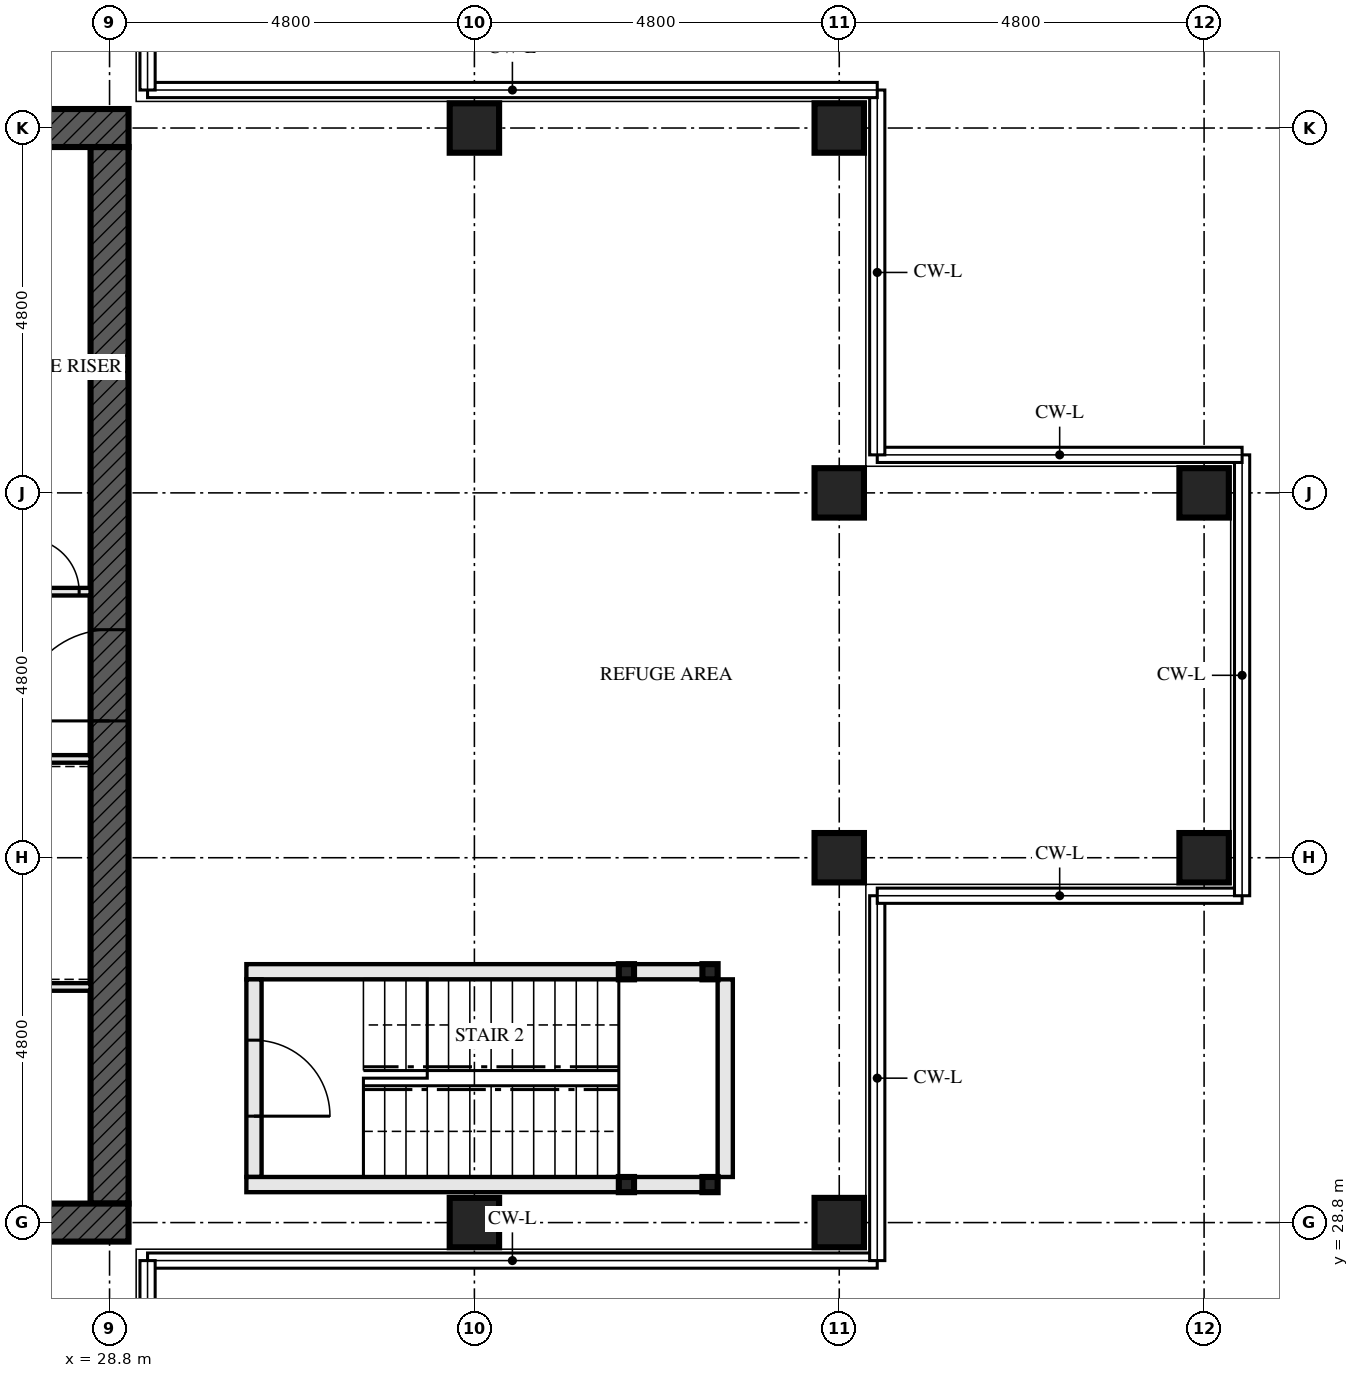
"""IFC4 building model, lengths in metres.
Left out: names, types, materials, properties, quantities, classifications, styles, units other than length and angle.
Written with IfcOpenShell. Run it as: python <this file> out.ifc"""

import sys

from ifc_helpers import new_model, si_unit, direction, frame, frame_2d, origin, origin_2d, place, context, subcontext, project, spatial, rectangle, hollow_rectangle, extrude, element, fill, save


model = new_model("IFC4")
c1 = context("Model", 3, precision=1e-05, world=origin(), true_north=direction((0.0, 1.0)))
c2 = subcontext(c1, "Body", "Model", "MODEL_VIEW")
j1 = project(units=[si_unit("LENGTHUNIT", "METRE"), si_unit("PLANEANGLEUNIT", "RADIAN")], contexts=[c1])
p1 = place(None, origin())
s1 = spatial("IfcSite", under=j1, at=p1, CompositionType="ELEMENT")
p2 = place(p1, origin())
s2 = spatial("IfcBuilding", under=s1, at=p2, CompositionType="ELEMENT")
p3 = place(p2, frame((0.0, 0.0, 190.0)))
s3 = spatial("IfcBuildingStorey", under=s2, at=p3, CompositionType="ELEMENT", Elevation=190.0)
for number, where, z_axis, x_axis in (
    (1, (33.6, 28.8, 0.0), (0.0, 0.0, 1.0), (0.0, 1.0, 0.0)),
    (2, (33.6, 43.2, 0.0), (0.0, 0.0, 1.0), (0.0, 1.0, 0.0)),
    (3, (38.4, 28.8, 0.0), (0.0, 0.0, 1.0), (0.0, 1.0, 0.0)),
    (4, (38.4, 33.6, 0.0), (0.0, 0.0, 1.0), (0.0, 1.0, 0.0)),
    (5, (38.4, 38.4, 0.0), (0.0, 0.0, 1.0), (0.0, 1.0, 0.0)),
    (6, (38.4, 43.2, 0.0), (0.0, 0.0, 1.0), (0.0, 1.0, 0.0)),
    (7, (43.2, 33.6, 0.0), (0.0, 0.0, 1.0), (0.0, 1.0, 0.0)),
    (8, (43.2, 38.4, 0.0), (0.0, 0.0, 1.0), (0.0, 1.0, 0.0)),
):
    element("IfcColumn", number, at=place(p3, frame(where, z_axis=z_axis, x_axis=x_axis)), inside=s3, PredefinedType="COLUMN", context=c2, shape_type="SweptSolid", body=[
        extrude(hollow_rectangle(XDim=0.65, YDim=0.65, WallThickness=0.08, at=origin_2d()), origin(), (0.0, 0.0, 1.0), 4.5),
    ])
p4 = place(p3, frame((14.15, 28.8, -0.25), z_axis=(0.0, 0.0, 1.0), x_axis=(1.0, 0.0, 0.0)))
e9 = element("IfcWall", 9, at=p4, inside=s3, PredefinedType="SHEAR", context=c2, shape_type="SweptSolid", body=[
    extrude(rectangle(XDim=14.9, YDim=0.5, at=frame_2d((7.45, 0.0))), origin(), (0.0, 0.0, 1.0), 4.58),
])
p5 = place(p4, frame((6.85, 0.0, 0.25)))
e10 = element("IfcOpeningElement", 10, at=p5, cuts=e9, PredefinedType="OPENING", context=c2, shape_type="SweptSolid", body=[
    extrude(rectangle(XDim=1.2, YDim=2.1, at=frame_2d((0.6, 1.05))), frame((0.0, 0.26, 0.0), z_axis=(0.0, -1.0, 0.0), x_axis=(1.0, 0.0, 0.0)), (0.0, 0.0, 1.0), 0.521),
])
p6 = place(p3, frame((29.05, 43.2, -0.25), z_axis=(0.0, 0.0, 1.0), x_axis=(-1.0, 0.0, 0.0)))
e11 = element("IfcWall", 11, at=p6, inside=s3, PredefinedType="SHEAR", context=c2, shape_type="SweptSolid", body=[
    extrude(rectangle(XDim=14.9, YDim=0.5, at=frame_2d((7.45, 0.0))), origin(), (0.0, 0.0, 1.0), 4.58),
])
p7 = place(p6, frame((6.85, 0.0, 0.25)))
e12 = element("IfcOpeningElement", 12, at=p7, cuts=e11, PredefinedType="OPENING", context=c2, shape_type="SweptSolid", body=[
    extrude(rectangle(XDim=1.2, YDim=2.1, at=frame_2d((0.6, 1.05))), frame((0.0, 0.26, 0.0), z_axis=(0.0, -1.0, 0.0), x_axis=(1.0, 0.0, 0.0)), (0.0, 0.0, 1.0), 0.521),
])
p8 = place(p3, frame((28.8, 29.05, -0.25), z_axis=(0.0, 0.0, 1.0), x_axis=(0.0, 1.0, 0.0)))
e13 = element("IfcWall", 13, at=p8, inside=s3, PredefinedType="SHEAR", context=c2, shape_type="SweptSolid", body=[
    extrude(rectangle(XDim=13.9, YDim=0.5, at=frame_2d((6.95, 0.0))), origin(), (0.0, 0.0, 1.0), 4.58),
])
p9 = place(p8, frame((6.35, 0.0, 0.25)))
e14 = element("IfcOpeningElement", 14, at=p9, cuts=e13, PredefinedType="OPENING", context=c2, shape_type="SweptSolid", body=[
    extrude(rectangle(XDim=1.2, YDim=2.1, at=frame_2d((0.6, 1.05))), frame((0.0, 0.26, 0.0), z_axis=(0.0, -1.0, 0.0), x_axis=(1.0, 0.0, 0.0)), (0.0, 0.0, 1.0), 0.521),
])
for number, where, z_axis, x_axis in (
    (15, (36.7, 29.3, 0.0), (0.0, 0.0, 1.0), (1.0, 0.0, 0.0)),
    (16, (36.7, 32.1, 0.0), (0.0, 0.0, 1.0), (1.0, 0.0, 0.0)),
    (17, (35.6, 29.3, 0.0), (0.0, 0.0, 1.0), (1.0, 0.0, 0.0)),
    (18, (35.6, 32.1, 0.0), (0.0, 0.0, 1.0), (1.0, 0.0, 0.0)),
):
    element("IfcColumn", number, at=place(p3, frame(where, z_axis=z_axis, x_axis=x_axis)), inside=s3, PredefinedType="COLUMN", context=c2, shape_type="SweptSolid", body=[
        extrude(hollow_rectangle(XDim=0.2, YDim=0.2, WallThickness=0.008, at=origin_2d()), origin(), (0.0, 0.0, 1.0), 4.33),
    ])
p10 = place(p3, frame((36.6, 29.3, 0.0), z_axis=(0.0, 0.0, 1.0), x_axis=(-1.0, 0.0, 0.0)))
e19 = element("IfcWall", 19, at=p10, inside=s3, PredefinedType="SOLIDWALL", context=c2, shape_type="SweptSolid", body=[
    extrude(rectangle(XDim=0.9, YDim=0.2, at=frame_2d((0.45, 0.0))), origin(), (0.0, 0.0, 1.0), 3.99),
])
p11 = place(p3, frame((35.5, 29.3, 0.0), z_axis=(0.0, 0.0, 1.0), x_axis=(-1.0, 0.0, 0.0)))
e20 = element("IfcWall", 20, at=p11, inside=s3, PredefinedType="SOLIDWALL", context=c2, shape_type="SweptSolid", body=[
    extrude(rectangle(XDim=4.9, YDim=0.2, at=frame_2d((2.45, 0.0))), origin(), (0.0, 0.0, 1.0), 3.99),
])
p12 = place(p3, frame((36.6, 32.1, 0.0), z_axis=(0.0, 0.0, 1.0), x_axis=(-1.0, 0.0, 0.0)))
e21 = element("IfcWall", 21, at=p12, inside=s3, PredefinedType="SOLIDWALL", context=c2, shape_type="SweptSolid", body=[
    extrude(rectangle(XDim=0.9, YDim=0.2, at=frame_2d((0.45, 0.0))), origin(), (0.0, 0.0, 1.0), 3.99),
])
p13 = place(p3, frame((35.5, 32.1, 0.0), z_axis=(0.0, 0.0, 1.0), x_axis=(-1.0, 0.0, 0.0)))
e22 = element("IfcWall", 22, at=p13, inside=s3, PredefinedType="SOLIDWALL", context=c2, shape_type="SweptSolid", body=[
    extrude(rectangle(XDim=4.9, YDim=0.2, at=frame_2d((2.45, 0.0))), origin(), (0.0, 0.0, 1.0), 3.99),
])
p14 = place(p3, frame((36.9, 29.4, 0.0), z_axis=(0.0, 0.0, 1.0), x_axis=(0.0, 1.0, 0.0)))
e23 = element("IfcWall", 23, at=p14, inside=s3, PredefinedType="SOLIDWALL", context=c2, shape_type="SweptSolid", body=[
    extrude(rectangle(XDim=2.6, YDim=0.2, at=frame_2d((1.3, 0.0))), origin(), (0.0, 0.0, 1.0), 4.33),
])
p15 = place(p3, frame((30.7, 29.4, 0.0), z_axis=(0.0, 0.0, 1.0), x_axis=(0.0, 1.0, 0.0)))
e24 = element("IfcWall", 24, at=p15, inside=s3, PredefinedType="SOLIDWALL", context=c2, shape_type="SweptSolid", body=[
    extrude(rectangle(XDim=2.6, YDim=0.2, at=frame_2d((1.3, 0.0))), origin(), (0.0, 0.0, 1.0), 4.33),
])
p16 = place(p15, frame((0.8, 0.0, 0.0)))
e25 = element("IfcOpeningElement", 25, at=p16, cuts=e24, PredefinedType="OPENING", context=c2, shape_type="SweptSolid", body=[
    extrude(rectangle(XDim=1.0, YDim=2.1, at=frame_2d((0.5, 1.05))), frame((0.0, 0.111, 0.0), z_axis=(0.0, -1.0, 0.0), x_axis=(1.0, 0.0, 0.0)), (0.0, 0.0, 1.0), 0.221),
])
p17 = place(p3, frame((23.05, 34.9, 0.0), z_axis=(0.0, 0.0, 1.0), x_axis=(1.0, 0.0, 0.0)))
e26 = element("IfcWall", 26, at=p17, inside=s3, PredefinedType="SOLIDWALL", context=c2, shape_type="SweptSolid", body=[
    extrude(rectangle(XDim=5.5, YDim=0.1, at=frame_2d((2.75, 0.0))), origin(), (0.0, 0.0, 1.0), 4.33),
])
p18 = place(p17, frame((0.85, 0.0, 0.0)))
e27 = element("IfcOpeningElement", 27, at=p18, cuts=e26, PredefinedType="OPENING", context=c2, shape_type="SweptSolid", body=[
    extrude(rectangle(XDim=1.0, YDim=2.1, at=frame_2d((0.5, 1.05))), frame((0.0, 0.061, 0.0), z_axis=(0.0, -1.0, 0.0), x_axis=(1.0, 0.0, 0.0)), (0.0, 0.0, 1.0), 0.121),
])
p19 = place(p17, frame((3.625, 0.0, 0.0)))
e28 = element("IfcOpeningElement", 28, at=p19, cuts=e26, PredefinedType="OPENING", context=c2, shape_type="SweptSolid", body=[
    extrude(rectangle(XDim=1.0, YDim=2.1, at=frame_2d((0.5, 1.05))), frame((0.0, 0.061, 0.0), z_axis=(0.0, -1.0, 0.0), x_axis=(1.0, 0.0, 0.0)), (0.0, 0.0, 1.0), 0.121),
])
p20 = place(p3, frame((22.65, 37.1, 0.0), z_axis=(0.0, 0.0, 1.0), x_axis=(1.0, 0.0, 0.0)))
e29 = element("IfcWall", 29, at=p20, inside=s3, PredefinedType="SOLIDWALL", context=c2, shape_type="SweptSolid", body=[
    extrude(rectangle(XDim=5.9, YDim=0.1, at=frame_2d((2.95, 0.0))), origin(), (0.0, 0.0, 1.0), 4.33),
])
p21 = place(p20, frame((3.5, 0.0, 0.0)))
e30 = element("IfcOpeningElement", 30, at=p21, cuts=e29, PredefinedType="OPENING", context=c2, shape_type="SweptSolid", body=[
    extrude(rectangle(XDim=0.9, YDim=2.1, at=frame_2d((0.45, 1.05))), frame((0.0, 0.061, 0.0), z_axis=(0.0, -1.0, 0.0), x_axis=(1.0, 0.0, 0.0)), (0.0, 0.0, 1.0), 0.121),
])
p22 = place(p20, frame((5.05, 0.0, 0.0)))
e31 = element("IfcOpeningElement", 31, at=p22, cuts=e29, PredefinedType="OPENING", context=c2, shape_type="SweptSolid", body=[
    extrude(rectangle(XDim=0.7, YDim=2.1, at=frame_2d((0.35, 1.05))), frame((0.0, 0.061, 0.0), z_axis=(0.0, -1.0, 0.0), x_axis=(1.0, 0.0, 0.0)), (0.0, 0.0, 1.0), 0.121),
])
p23 = place(p3, frame((23.15, 31.9, 0.0), z_axis=(0.0, 0.0, 1.0), x_axis=(1.0, 0.0, 0.0)))
e32 = element("IfcWall", 32, at=p23, inside=s3, PredefinedType="SOLIDWALL", context=c2, shape_type="SweptSolid", body=[
    extrude(rectangle(XDim=5.4, YDim=0.1, at=frame_2d((2.7, 0.0))), origin(), (0.0, 0.0, 1.0), 4.33),
])
p24 = place(p16, frame((1.0, 0.0, 0.0), z_axis=(0.0, 0.0, 1.0), x_axis=(-1.0, 0.0, 0.0)))
e33 = element("IfcDoor", 33, at=p24, inside=s3, OperationType="SINGLE_SWING_LEFT", PredefinedType="DOOR", context=c2, shape_type="SweptSolid", body=[
    extrude(rectangle(XDim=1.0, YDim=2.1, at=frame_2d((0.5, 1.05))), frame((0.0, 0.032, 0.0), z_axis=(0.0, -1.0, 0.0), x_axis=(1.0, 0.0, 0.0)), (0.0, 0.0, 1.0), 0.064),
])
fill(e25, e33)
p25 = place(p22, origin())
e34 = element("IfcDoor", 34, at=p25, inside=s3, OperationType="SINGLE_SWING_RIGHT", PredefinedType="DOOR", context=c2, shape_type="SweptSolid", body=[
    extrude(rectangle(XDim=0.7, YDim=2.1, at=frame_2d((0.35, 1.05))), frame((0.0, 0.027, 0.0), z_axis=(0.0, -1.0, 0.0), x_axis=(1.0, 0.0, 0.0)), (0.0, 0.0, 1.0), 0.054),
])
fill(e31, e34)
p26 = place(p9, origin())
e35 = element("IfcDoor", 35, at=p26, inside=s3, OperationType="SINGLE_SWING_LEFT", PredefinedType="DOOR", context=c2, shape_type="SweptSolid", body=[
    extrude(rectangle(XDim=1.2, YDim=2.1, at=frame_2d((0.6, 1.05))), frame((0.0, 0.027, 0.0), z_axis=(0.0, -1.0, 0.0), x_axis=(1.0, 0.0, 0.0)), (0.0, 0.0, 1.0), 0.054),
])
fill(e14, e35)
save(model, sys.argv[1])
